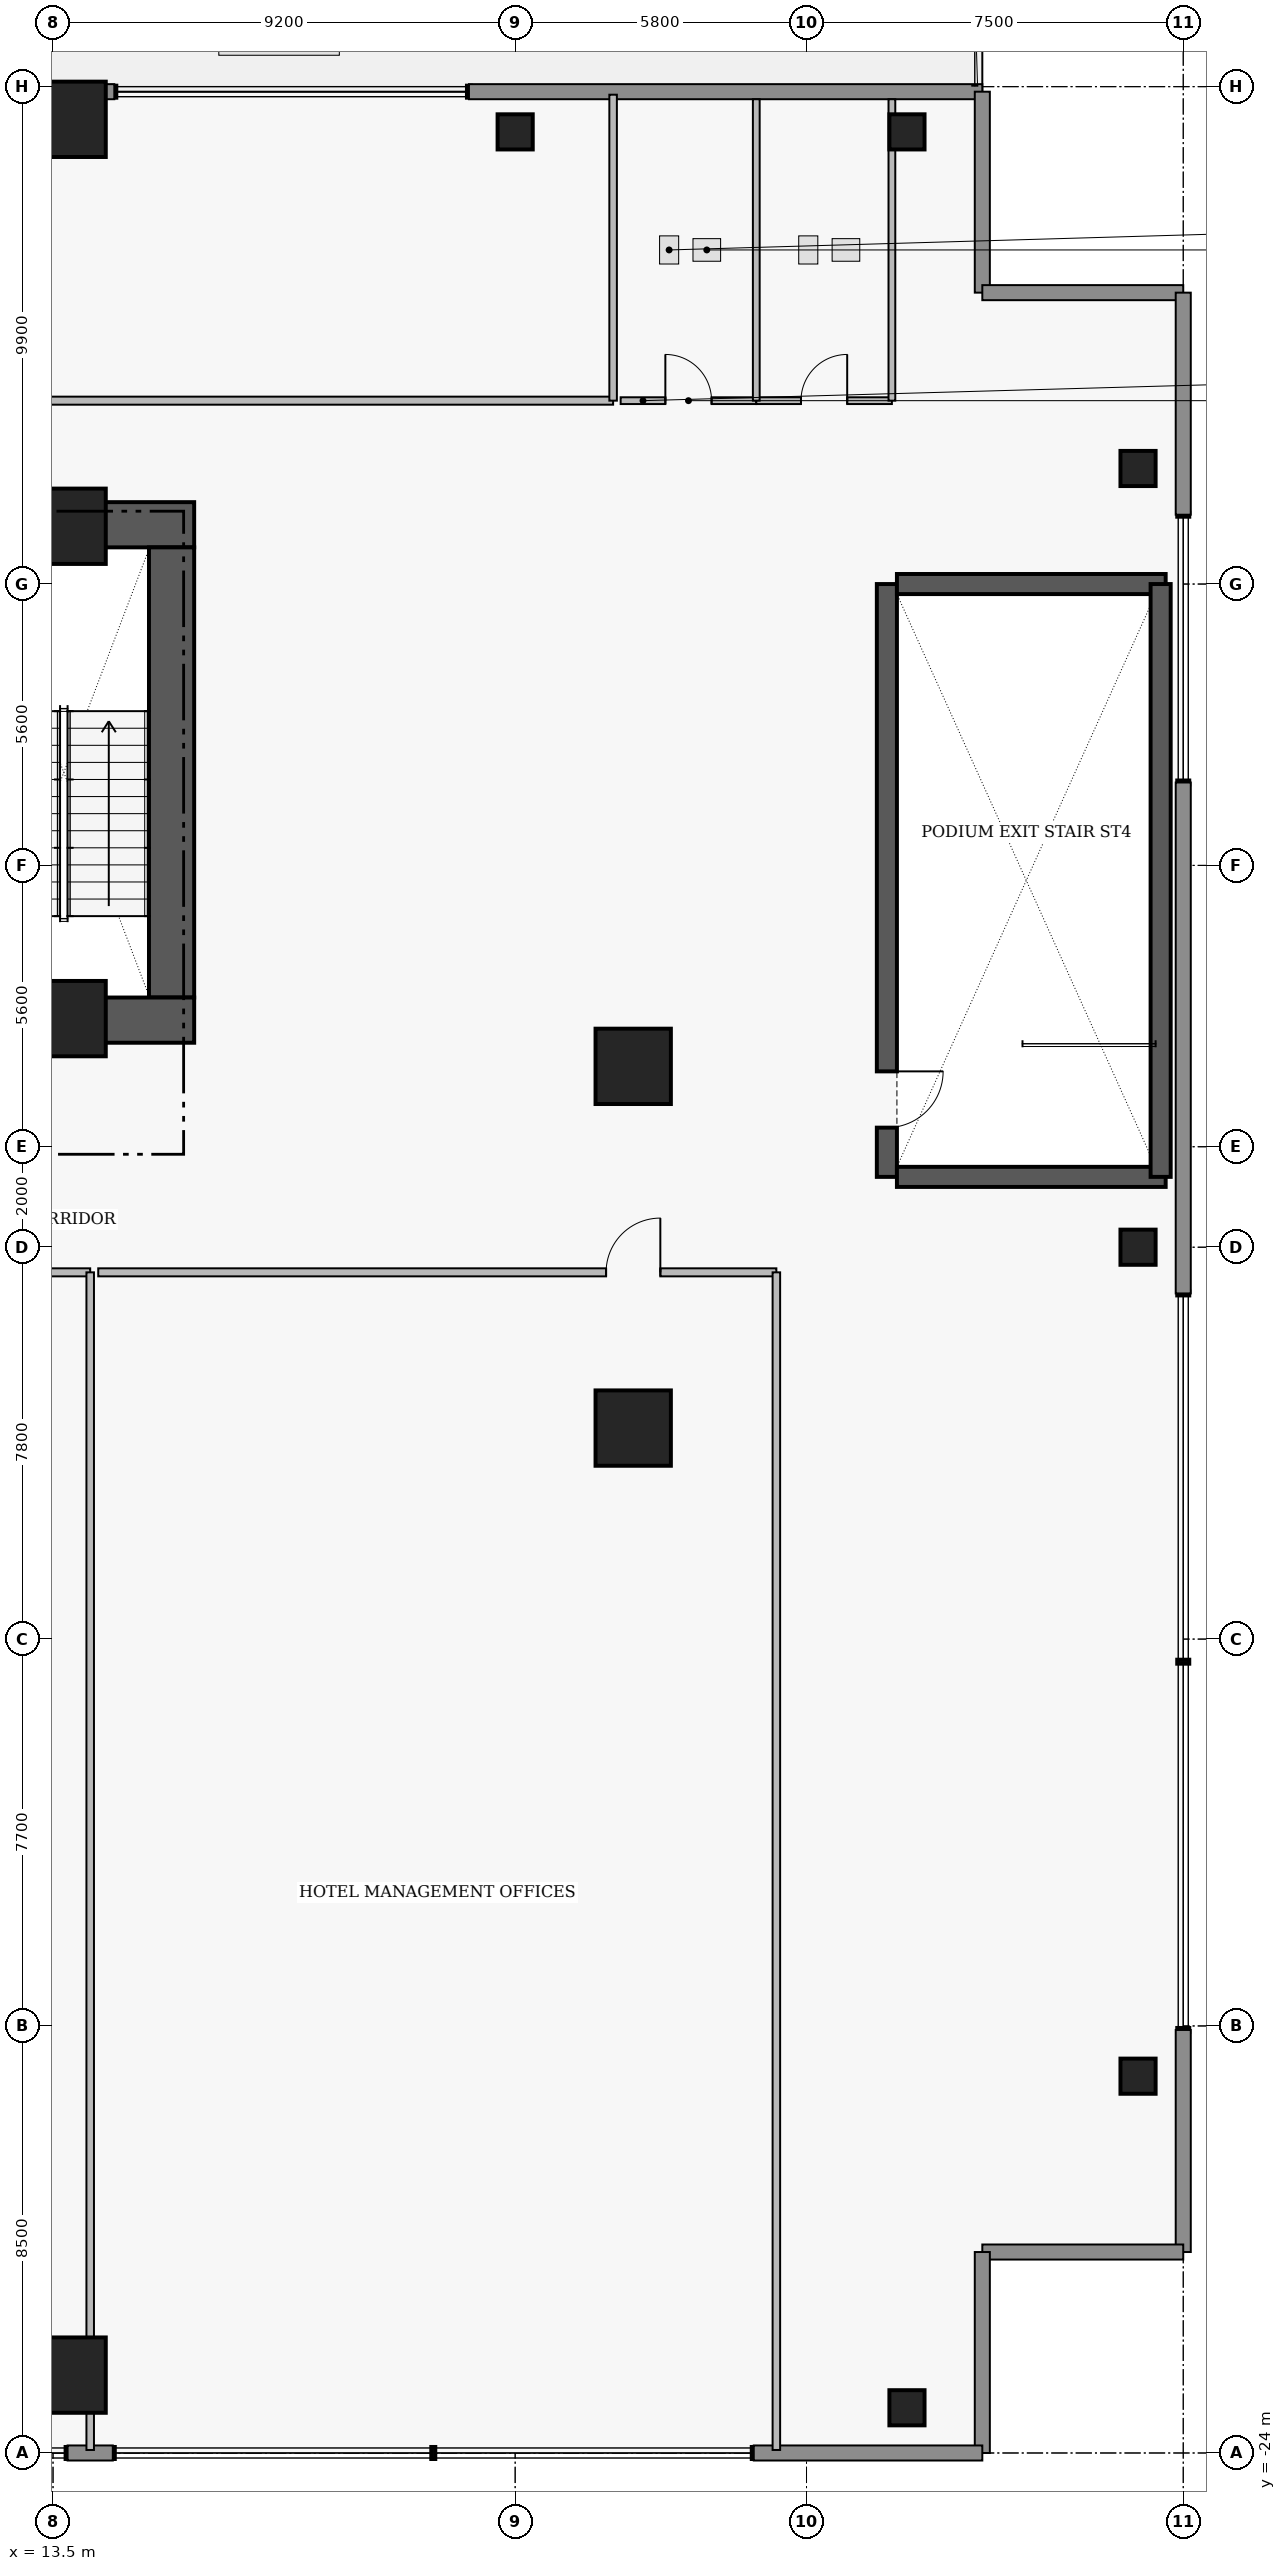
"""IFC4 building model, lengths in metres.
Left out: names, types, materials, properties, quantities, classifications, styles, units other than length and angle.
Written with IfcOpenShell. Run it as: python <this file> out.ifc"""

import sys

from ifc_helpers import new_model, si_unit, direction, frame, frame_2d, origin, origin_2d, place, context, subcontext, project, spatial, rectangle, extrude, element, fill, save


model = new_model("IFC4")
c1 = context("Model", 3, precision=1e-05, world=origin(), true_north=direction((0.0, 1.0)))
c2 = subcontext(c1, "Body", "Model", "MODEL_VIEW")
j1 = project(units=[si_unit("LENGTHUNIT", "METRE"), si_unit("PLANEANGLEUNIT", "RADIAN")], contexts=[c1])
p1 = place(None, origin())
s1 = spatial("IfcSite", under=j1, at=p1, CompositionType="ELEMENT")
p2 = place(p1, origin())
s2 = spatial("IfcBuilding", under=s1, at=p2, CompositionType="ELEMENT")
p3 = place(p2, frame((0.0, 0.0, 22.8)))
s3 = spatial("IfcBuildingStorey", under=s2, at=p3, CompositionType="ELEMENT", Elevation=22.8)
p4 = place(p3, frame((11.6, 14.38, 0.0), z_axis=(0.0, 0.0, 1.0), x_axis=(1.0, 0.0, 0.0)))
e1 = element("IfcWall", 1, at=p4, inside=s3, PredefinedType="SHEAR", context=c2, shape_type="SweptSolid", body=[
    extrude(rectangle(XDim=4.71, YDim=0.9, at=frame_2d((2.355, 0.0))), origin(), (0.0, 0.0, 1.0), 4.61),
])
p5 = place(p3, frame((15.86, 4.97, 0.0), z_axis=(0.0, 0.0, 1.0), x_axis=(0.0, 1.0, 0.0)))
e2 = element("IfcWall", 2, at=p5, inside=s3, PredefinedType="SHEAR", context=c2, shape_type="SweptSolid", body=[
    extrude(rectangle(XDim=8.96, YDim=0.9, at=frame_2d((4.48, 0.0))), origin(), (0.0, 0.0, 1.0), 4.61),
])
p6 = place(p3, frame((11.6, 4.52, 0.0), z_axis=(0.0, 0.0, 1.0), x_axis=(1.0, 0.0, 0.0)))
e3 = element("IfcWall", 3, at=p6, inside=s3, PredefinedType="SHEAR", context=c2, shape_type="SweptSolid", body=[
    extrude(rectangle(XDim=4.71, YDim=0.9, at=frame_2d((2.355, 0.0))), origin(), (0.0, 0.0, 1.0), 4.61),
])
p7 = place(p3, frame((30.1, 13.2, 0.0), z_axis=(0.0, 0.0, 1.0), x_axis=(0.0, -1.0, 0.0)))
e4 = element("IfcWall", 4, at=p7, inside=s3, PredefinedType="SHEAR", context=c2, shape_type="SweptSolid", body=[
    extrude(rectangle(XDim=11.8, YDim=0.4, at=frame_2d((5.9, 0.0))), origin(), (0.0, 0.0, 1.0), 4.61),
])
p8 = place(p7, frame((9.7, 0.0, 0.0)))
e5 = element("IfcOpeningElement", 5, at=p8, cuts=e4, PredefinedType="OPENING", context=c2, shape_type="SweptSolid", body=[
    extrude(rectangle(XDim=1.12, YDim=2.22, at=frame_2d((0.56, 1.11))), frame((0.0, 0.21, 0.0), z_axis=(0.0, -1.0, 0.0), x_axis=(1.0, 0.0, 0.0)), (0.0, 0.0, 1.0), 0.42),
])
for number, where, z_axis, x_axis in (
    (6, (30.3, 1.4, 0.0), (0.0, 0.0, 1.0), (1.0, 0.0, 0.0)),
    (7, (30.3, 13.2, 0.0), (0.0, 0.0, 1.0), (1.0, 0.0, 0.0)),
):
    element("IfcWall", number, at=place(p3, frame(where, z_axis=z_axis, x_axis=x_axis)), inside=s3, PredefinedType="SHEAR", context=c2, shape_type="SweptSolid", body=[
        extrude(rectangle(XDim=5.35, YDim=0.4, at=frame_2d((2.675, 0.0))), origin(), (0.0, 0.0, 1.0), 4.61),
    ])
p9 = place(p3, frame((35.55, 1.4, 0.0), z_axis=(0.0, 0.0, 1.0), x_axis=(0.0, 1.0, 0.0)))
e8 = element("IfcWall", 8, at=p9, inside=s3, PredefinedType="SHEAR", context=c2, shape_type="SweptSolid", body=[
    extrude(rectangle(XDim=11.8, YDim=0.4, at=frame_2d((5.9, 0.0))), origin(), (0.0, 0.0, 1.0), 4.61),
])
for number, where, z_axis, x_axis in (
    (9, (13.8, 14.35, 0.0), (0.0, 0.0, 1.0), (1.0, 0.0, 0.0)),
    (10, (13.8, 4.55, 0.0), (0.0, 0.0, 1.0), (1.0, 0.0, 0.0)),
    (11, (13.8, -22.45, 0.0), (0.0, 0.0, 1.0), (1.0, 0.0, 0.0)),
    (12, (13.8, 22.45, 0.0), (0.0, 0.0, 1.0), (1.0, 0.0, 0.0)),
    (13, (25.05, -3.6, 0.0), (0.0, 0.0, 1.0), (1.0, 0.0, 0.0)),
    (14, (25.05, 3.6, 0.0), (0.0, 0.0, 1.0), (1.0, 0.0, 0.0)),
):
    element("IfcColumn", number, at=place(p3, frame(where, z_axis=z_axis, x_axis=x_axis)), inside=s3, PredefinedType="COLUMN", context=c2, shape_type="SweptSolid", body=[
        extrude(rectangle(XDim=1.5, YDim=1.5, at=origin_2d()), origin(), (0.0, 0.0, 1.0), 4.8),
    ])
for number, where, z_axis, x_axis in (
    (15, (30.5, -23.1, 0.0), (0.0, 0.0, 1.0), (1.0, 0.0, 0.0)),
    (16, (30.5, 22.2, 0.0), (0.0, 0.0, 1.0), (1.0, 0.0, 0.0)),
    (17, (35.1, -16.5, 0.0), (0.0, 0.0, 1.0), (1.0, 0.0, 0.0)),
    (18, (35.1, 0.0, 0.0), (0.0, 0.0, 1.0), (1.0, 0.0, 0.0)),
    (19, (35.1, 15.5, 0.0), (0.0, 0.0, 1.0), (1.0, 0.0, 0.0)),
    (20, (22.7, 22.2, 0.0), (0.0, 0.0, 1.0), (1.0, 0.0, 0.0)),
):
    element("IfcColumn", number, at=place(p3, frame(where, z_axis=z_axis, x_axis=x_axis)), inside=s3, PredefinedType="COLUMN", context=c2, shape_type="SweptSolid", body=[
        extrude(rectangle(XDim=0.7, YDim=0.7, at=origin_2d()), origin(), (0.0, 0.0, 1.0), 4.8),
    ])
p10 = place(p3, frame((12.88, 23.0, 0.0), z_axis=(0.0, 0.0, 1.0), x_axis=(1.0, 0.0, 0.0)))
e21 = element("IfcWall", 21, at=p10, inside=s3, PredefinedType="STANDARD", context=c2, shape_type="SweptSolid", body=[
    extrude(rectangle(XDim=1.84, YDim=0.3, at=frame_2d((0.92, 0.0))), origin(), (0.0, 0.0, 1.0), 4.58),
])
p11 = place(p3, frame((21.78, 23.0, 0.0), z_axis=(0.0, 0.0, 1.0), x_axis=(1.0, 0.0, 0.0)))
e22 = element("IfcWall", 22, at=p11, inside=s3, PredefinedType="STANDARD", context=c2, shape_type="SweptSolid", body=[
    extrude(rectangle(XDim=10.22, YDim=0.3, at=frame_2d((5.11, 0.0))), origin(), (0.0, 0.0, 1.0), 4.58),
])
for number, where, z_axis, x_axis in (
    (23, (32.0, 23.0, 0.0), (0.0, 0.0, 1.0), (0.0, -1.0, 0.0)),
    (24, (32.0, 19.0, 0.0), (0.0, 0.0, 1.0), (1.0, 0.0, 0.0)),
):
    element("IfcWall", number, at=place(p3, frame(where, z_axis=z_axis, x_axis=x_axis)), inside=s3, PredefinedType="STANDARD", context=c2, shape_type="SweptSolid", body=[
        extrude(rectangle(XDim=4.0, YDim=0.3, at=frame_2d((2.0, 0.0))), origin(), (0.0, 0.0, 1.0), 4.58),
    ])
p12 = place(p3, frame((36.0, 19.0, 0.0), z_axis=(0.0, 0.0, 1.0), x_axis=(0.0, -1.0, 0.0)))
e25 = element("IfcWall", 25, at=p12, inside=s3, PredefinedType="STANDARD", context=c2, shape_type="SweptSolid", body=[
    extrude(rectangle(XDim=4.42, YDim=0.3, at=frame_2d((2.21, 0.0))), origin(), (0.0, 0.0, 1.0), 4.58),
])
p13 = place(p3, frame((36.0, 9.25, 0.0), z_axis=(0.0, 0.0, 1.0), x_axis=(0.0, -1.0, 0.0)))
e26 = element("IfcWall", 26, at=p13, inside=s3, PredefinedType="STANDARD", context=c2, shape_type="SweptSolid", body=[
    extrude(rectangle(XDim=10.17, YDim=0.3, at=frame_2d((5.085, 0.0))), origin(), (0.0, 0.0, 1.0), 4.58),
])
p14 = place(p3, frame((36.0, -15.58, 0.0), z_axis=(0.0, 0.0, 1.0), x_axis=(0.0, -1.0, 0.0)))
e27 = element("IfcWall", 27, at=p14, inside=s3, PredefinedType="STANDARD", context=c2, shape_type="SweptSolid", body=[
    extrude(rectangle(XDim=4.42, YDim=0.3, at=frame_2d((2.21, 0.0))), origin(), (0.0, 0.0, 1.0), 4.58),
])
for number, where, z_axis, x_axis in (
    (28, (36.0, -20.0, 0.0), (0.0, 0.0, 1.0), (-1.0, 0.0, 0.0)),
    (29, (32.0, -20.0, 0.0), (0.0, 0.0, 1.0), (0.0, -1.0, 0.0)),
):
    element("IfcWall", number, at=place(p3, frame(where, z_axis=z_axis, x_axis=x_axis)), inside=s3, PredefinedType="STANDARD", context=c2, shape_type="SweptSolid", body=[
        extrude(rectangle(XDim=4.0, YDim=0.3, at=frame_2d((2.0, 0.0))), origin(), (0.0, 0.0, 1.0), 4.58),
    ])
p15 = place(p3, frame((32.0, -24.0, 0.0), z_axis=(0.0, 0.0, 1.0), x_axis=(-1.0, 0.0, 0.0)))
e30 = element("IfcWall", 30, at=p15, inside=s3, PredefinedType="STANDARD", context=c2, shape_type="SweptSolid", body=[
    extrude(rectangle(XDim=4.55, YDim=0.3, at=frame_2d((2.275, 0.0))), origin(), (0.0, 0.0, 1.0), 4.58),
])
p16 = place(p3, frame((14.69, -24.0, 0.0), z_axis=(0.0, 0.0, 1.0), x_axis=(-1.0, 0.0, 0.0)))
e31 = element("IfcWall", 31, at=p16, inside=s3, PredefinedType="STANDARD", context=c2, shape_type="SweptSolid", body=[
    extrude(rectangle(XDim=0.9, YDim=0.3, at=frame_2d((0.45, 0.0))), origin(), (0.0, 0.0, 1.0), 4.58),
])
p17 = place(p3, frame((-27.9, 16.85, 0.0), z_axis=(0.0, 0.0, 1.0), x_axis=(1.0, 0.0, 0.0)))
e32 = element("IfcWall", 32, at=p17, inside=s3, PredefinedType="PARTITIONING", context=c2, shape_type="SweptSolid", body=[
    extrude(rectangle(XDim=52.55, YDim=0.16, at=frame_2d((26.275, 0.0))), origin(), (0.0, 0.0, 1.0), 4.123),
])
p18 = place(p17, frame((25.735, 0.0, 0.0)))
e33 = element("IfcOpeningElement", 33, at=p18, cuts=e32, PredefinedType="OPENING", context=c2, shape_type="SweptSolid", body=[
    extrude(rectangle(XDim=1.08, YDim=2.18, at=frame_2d((0.54, 1.09))), frame((0.0, 0.09, 0.0), z_axis=(0.0, -1.0, 0.0), x_axis=(1.0, 0.0, 0.0)), (0.0, 0.0, 1.0), 0.18),
])
p19 = place(p3, frame((-14.24, -0.5, 0.0), z_axis=(0.0, 0.0, 1.0), x_axis=(1.0, 0.0, 0.0)))
e34 = element("IfcWall", 34, at=p19, inside=s3, PredefinedType="PARTITIONING", context=c2, shape_type="SweptSolid", body=[
    extrude(rectangle(XDim=28.48, YDim=0.16, at=frame_2d((14.24, 0.0))), origin(), (0.0, 0.0, 1.0), 4.58),
])
p20 = place(p19, frame((13.7, 0.0, 0.0)))
e35 = element("IfcOpeningElement", 35, at=p20, cuts=e34, PredefinedType="OPENING", context=c2, shape_type="SweptSolid", body=[
    extrude(rectangle(XDim=1.08, YDim=2.18, at=frame_2d((0.54, 1.09))), frame((0.0, 0.09, 0.0), z_axis=(0.0, -1.0, 0.0), x_axis=(1.0, 0.0, 0.0)), (0.0, 0.0, 1.0), 0.18),
])
p21 = place(p3, frame((14.4, -0.5, 0.0), z_axis=(0.0, 0.0, 1.0), x_axis=(1.0, 0.0, 0.0)))
e36 = element("IfcWall", 36, at=p21, inside=s3, PredefinedType="PARTITIONING", context=c2, shape_type="SweptSolid", body=[
    extrude(rectangle(XDim=13.5, YDim=0.16, at=frame_2d((6.75, 0.0))), origin(), (0.0, 0.0, 1.0), 4.58),
])
p22 = place(p21, frame((10.11, 0.0, 0.0)))
e37 = element("IfcOpeningElement", 37, at=p22, cuts=e36, PredefinedType="OPENING", context=c2, shape_type="SweptSolid", body=[
    extrude(rectangle(XDim=1.08, YDim=2.18, at=frame_2d((0.54, 1.09))), frame((0.0, 0.09, 0.0), z_axis=(0.0, -1.0, 0.0), x_axis=(1.0, 0.0, 0.0)), (0.0, 0.0, 1.0), 0.18),
])
p23 = place(p3, frame((24.8, 16.85, 0.0), z_axis=(0.0, 0.0, 1.0), x_axis=(1.0, 0.0, 0.0)))
e38 = element("IfcWall", 38, at=p23, inside=s3, PredefinedType="PLUMBINGWALL", context=c2, shape_type="SweptSolid", body=[
    extrude(rectangle(XDim=2.7, YDim=0.135, at=frame_2d((1.35, 0.0))), origin(), (0.0, 0.0, 1.0), 4.58),
])
p24 = place(p23, frame((0.89, 0.0, 0.0)))
e39 = element("IfcOpeningElement", 39, at=p24, cuts=e38, PredefinedType="OPENING", context=c2, shape_type="SweptSolid", body=[
    extrude(rectangle(XDim=0.92, YDim=2.12, at=frame_2d((0.46, 1.06))), frame((0.0, 0.077, 0.0), z_axis=(0.0, -1.0, 0.0), x_axis=(1.0, 0.0, 0.0)), (0.0, 0.0, 1.0), 0.155),
])
p25 = place(p3, frame((27.5, 16.85, 0.0), z_axis=(0.0, 0.0, 1.0), x_axis=(1.0, 0.0, 0.0)))
e40 = element("IfcWall", 40, at=p25, inside=s3, PredefinedType="PLUMBINGWALL", context=c2, shape_type="SweptSolid", body=[
    extrude(rectangle(XDim=2.7, YDim=0.135, at=frame_2d((1.35, 0.0))), origin(), (0.0, 0.0, 1.0), 4.58),
])
p26 = place(p25, frame((0.89, 0.0, 0.0)))
e41 = element("IfcOpeningElement", 41, at=p26, cuts=e40, PredefinedType="OPENING", context=c2, shape_type="SweptSolid", body=[
    extrude(rectangle(XDim=0.92, YDim=2.12, at=frame_2d((0.46, 1.06))), frame((0.0, 0.077, 0.0), z_axis=(0.0, -1.0, 0.0), x_axis=(1.0, 0.0, 0.0)), (0.0, 0.0, 1.0), 0.155),
])
p27 = place(p3, frame((24.65, 16.85, 0.0), z_axis=(0.0, 0.0, 1.0), x_axis=(0.0, 1.0, 0.0)))
e42 = element("IfcWall", 42, at=p27, inside=s3, PredefinedType="PARTITIONING", context=c2, shape_type="SweptSolid", body=[
    extrude(rectangle(XDim=6.09, YDim=0.15, at=frame_2d((3.045, 0.0))), origin(), (0.0, 0.0, 1.0), 4.58),
])
p28 = place(p3, frame((14.24, -23.94, 0.0), z_axis=(0.0, 0.0, 1.0), x_axis=(0.0, 1.0, 0.0)))
e43 = element("IfcWall", 43, at=p28, inside=s3, PredefinedType="PARTITIONING", context=c2, shape_type="SweptSolid", body=[
    extrude(rectangle(XDim=23.44, YDim=0.15, at=frame_2d((11.72, 0.0))), origin(), (0.0, 0.0, 1.0), 3.818),
])
p29 = place(p3, frame((27.9, -23.94, 0.0), z_axis=(0.0, 0.0, 1.0), x_axis=(0.0, 1.0, 0.0)))
e44 = element("IfcWall", 44, at=p29, inside=s3, PredefinedType="PARTITIONING", context=c2, shape_type="SweptSolid", body=[
    extrude(rectangle(XDim=23.44, YDim=0.15, at=frame_2d((11.72, 0.0))), origin(), (0.0, 0.0, 1.0), 4.58),
])
for number, where, z_axis, x_axis in (
    (45, (30.2, 16.85, 0.0), (0.0, 0.0, 1.0), (0.0, 1.0, 0.0)),
    (46, (27.5, 16.85, 0.0), (0.0, 0.0, 1.0), (0.0, 1.0, 0.0)),
):
    element("IfcWall", number, at=place(p3, frame(where, z_axis=z_axis, x_axis=x_axis)), inside=s3, PredefinedType="PLUMBINGWALL", context=c2, shape_type="SweptSolid", body=[
        extrude(rectangle(XDim=6.0, YDim=0.135, at=frame_2d((3.0, 0.0))), origin(), (0.0, 0.0, 1.0), 4.58),
    ])
p30 = place(p8, origin())
e47 = element("IfcDoor", 47, at=p30, inside=s3, OperationType="SINGLE_SWING_LEFT", PredefinedType="DOOR", context=c2, shape_type="SweptSolid", body=[
    extrude(rectangle(XDim=1.12, YDim=2.22, at=frame_2d((0.56, 1.11))), frame((0.0, 0.025, 0.0), z_axis=(0.0, -1.0, 0.0), x_axis=(1.0, 0.0, 0.0)), (0.0, 0.0, 1.0), 0.05),
])
fill(e5, e47)
p31 = place(p22, origin())
e48 = element("IfcDoor", 48, at=p31, inside=s3, OperationType="SINGLE_SWING_RIGHT", PredefinedType="DOOR", context=c2, shape_type="SweptSolid", body=[
    extrude(rectangle(XDim=1.08, YDim=2.18, at=frame_2d((0.54, 1.09))), frame((0.0, 0.025, 0.0), z_axis=(0.0, -1.0, 0.0), x_axis=(1.0, 0.0, 0.0)), (0.0, 0.0, 1.0), 0.05),
])
fill(e37, e48)
p32 = place(p24, origin())
e49 = element("IfcDoor", 49, at=p32, inside=s3, OperationType="SINGLE_SWING_LEFT", PredefinedType="DOOR", context=c2, shape_type="SweptSolid", body=[
    extrude(rectangle(XDim=0.92, YDim=2.12, at=frame_2d((0.46, 1.06))), frame((0.0, 0.025, 0.0), z_axis=(0.0, -1.0, 0.0), x_axis=(1.0, 0.0, 0.0)), (0.0, 0.0, 1.0), 0.05),
])
fill(e39, e49)
p33 = place(p26, origin())
e50 = element("IfcDoor", 50, at=p33, inside=s3, OperationType="SINGLE_SWING_RIGHT", PredefinedType="DOOR", context=c2, shape_type="SweptSolid", body=[
    extrude(rectangle(XDim=0.92, YDim=2.12, at=frame_2d((0.46, 1.06))), frame((0.0, 0.025, 0.0), z_axis=(0.0, -1.0, 0.0), x_axis=(1.0, 0.0, 0.0)), (0.0, 0.0, 1.0), 0.05),
])
fill(e41, e50)
save(model, sys.argv[1])
